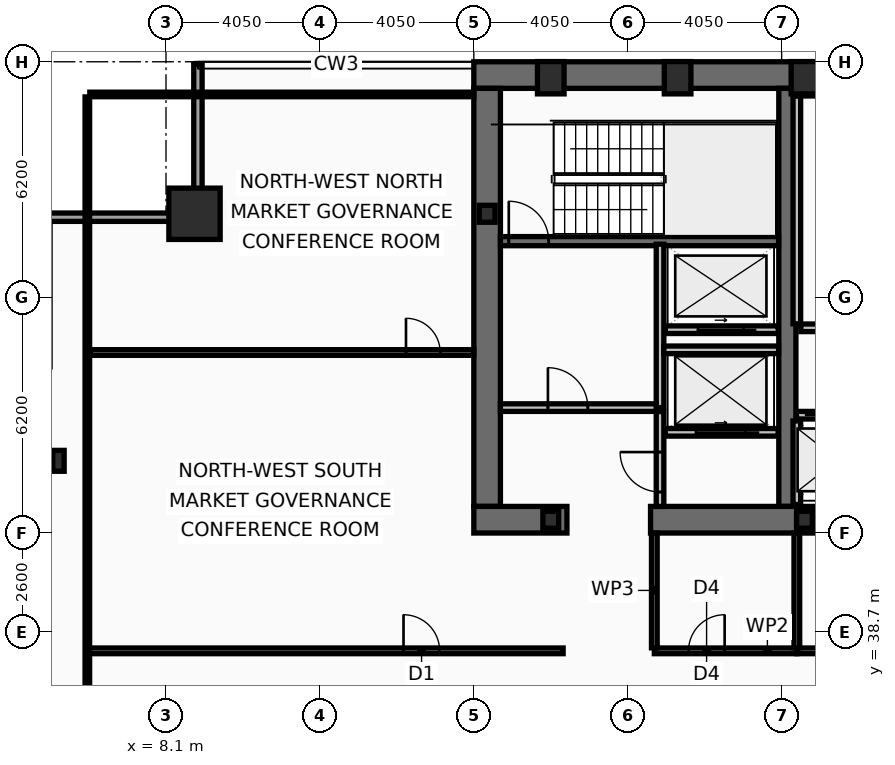
"""IFC4 building model, lengths in metres.
Left out: names, types, materials, properties, quantities, classifications, styles, units other than length and angle.
Written with IfcOpenShell. Run it as: python <this file> out.ifc"""

import sys

from ifc_helpers import new_model, si_unit, direction, frame, frame_2d, origin, origin_2d, place, context, subcontext, project, spatial, rectangle, hollow_rectangle, i_section, extrude, element, fill, save


model = new_model("IFC4")
c1 = context("Model", 3, precision=1e-05, world=origin(), true_north=direction((0.0, 1.0)))
c2 = subcontext(c1, "Body", "Model", "MODEL_VIEW")
j1 = project(units=[si_unit("LENGTHUNIT", "METRE"), si_unit("PLANEANGLEUNIT", "RADIAN")], contexts=[c1])
p1 = place(None, origin())
s1 = spatial("IfcSite", under=j1, at=p1, CompositionType="ELEMENT")
p2 = place(p1, origin())
s2 = spatial("IfcBuilding", under=s1, at=p2, CompositionType="ELEMENT")
p3 = place(p2, frame((0.0, 0.0, 161.4)))
s3 = spatial("IfcBuildingStorey", under=s2, at=p3, CompositionType="ELEMENT", Elevation=161.4)
p4 = place(p3, frame((16.2, 53.35, 0.0), z_axis=(0.0, 0.0, 1.0), x_axis=(1.0, 0.0, 0.0)))
e1 = element("IfcWall", 1, at=p4, inside=s3, PredefinedType="SHEAR", context=c2, shape_type="SweptSolid", body=[
    extrude(rectangle(XDim=40.5, YDim=0.7, at=frame_2d((20.25, 0.0))), origin(), (0.0, 0.0, 1.0), 3.44),
])
p5 = place(p3, frame((16.55, 42.0, 0.0), z_axis=(0.0, 0.0, 1.0), x_axis=(0.0, 1.0, 0.0)))
e2 = element("IfcWall", 2, at=p5, inside=s3, PredefinedType="SHEAR", context=c2, shape_type="SweptSolid", body=[
    extrude(rectangle(XDim=11.0, YDim=0.7, at=frame_2d((5.5, 0.0))), origin(), (0.0, 0.0, 1.0), 3.44),
])
p6 = place(p3, frame((24.45, 42.0, 0.0), z_axis=(0.0, 0.0, 1.0), x_axis=(0.0, 1.0, 0.0)))
e3 = element("IfcWall", 3, at=p6, inside=s3, PredefinedType="SHEAR", context=c2, shape_type="SweptSolid", body=[
    extrude(rectangle(XDim=11.0, YDim=0.45, at=frame_2d((5.5, 0.0))), origin(), (0.0, 0.0, 1.0), 3.44),
])
p7 = place(p3, frame((18.65, 41.65, 0.0), z_axis=(0.0, 0.0, 1.0), x_axis=(-1.0, 0.0, 0.0)))
e4 = element("IfcWall", 4, at=p7, inside=s3, PredefinedType="SHEAR", context=c2, shape_type="SweptSolid", body=[
    extrude(rectangle(XDim=2.45, YDim=0.7, at=frame_2d((1.225, 0.0))), origin(), (0.0, 0.0, 1.0), 3.44),
])
p8 = place(p3, frame((32.3, 41.65, 0.0), z_axis=(0.0, 0.0, 1.0), x_axis=(-1.0, 0.0, 0.0)))
e5 = element("IfcWall", 5, at=p8, inside=s3, PredefinedType="SHEAR", context=c2, shape_type="SweptSolid", body=[
    extrude(rectangle(XDim=11.45, YDim=0.7, at=frame_2d((5.725, 0.0))), origin(), (0.0, 0.0, 1.0), 3.44),
])
p9 = place(p3, frame((16.9, 48.98, 0.0), z_axis=(0.0, 0.0, 1.0), x_axis=(1.0, 0.0, 0.0)))
e6 = element("IfcWall", 6, at=p9, inside=s3, PredefinedType="SHEAR", context=c2, shape_type="SweptSolid", body=[
    extrude(rectangle(XDim=7.32, YDim=0.24, at=frame_2d((3.66, 0.0))), origin(), (0.0, 0.0, 1.0), 3.44),
])
p10 = place(p9, frame((0.22, 0.0, 0.0)))
e7 = element("IfcOpeningElement", 7, at=p10, cuts=e6, PredefinedType="OPENING", context=c2, shape_type="SweptSolid", body=[
    extrude(rectangle(XDim=1.05, YDim=2.15, at=frame_2d((0.525, 1.075))), frame((0.0, 0.13, 0.0), z_axis=(0.0, -1.0, 0.0), x_axis=(1.0, 0.0, 0.0)), (0.0, 0.0, 1.0), 0.26),
])
p11 = place(p3, frame((8.85, 49.7, 0.0), z_axis=(0.0, 0.0, 1.0), x_axis=(1.0, 0.0, 0.0)))
e8 = element("IfcColumn", 8, at=p11, inside=s3, PredefinedType="COLUMN", context=c2, shape_type="SweptSolid", body=[
    extrude(hollow_rectangle(XDim=1.35, YDim=1.35, WallThickness=0.065, at=origin_2d()), origin(), (0.0, 0.0, 1.0), 3.6),
])
for number, where, z_axis, x_axis in (
    (9, (18.225, 53.28, 0.0), (0.0, 0.0, 1.0), (1.0, 0.0, 0.0)),
    (10, (21.562, 53.28, 0.0), (0.0, 0.0, 1.0), (1.0, 0.0, 0.0)),
    (11, (24.9, 53.28, 0.0), (0.0, 0.0, 1.0), (1.0, 0.0, 0.0)),
):
    element("IfcColumn", number, at=place(p3, frame(where, z_axis=z_axis, x_axis=x_axis)), inside=s3, PredefinedType="COLUMN", context=c2, shape_type="SweptSolid", body=[
        extrude(hollow_rectangle(XDim=0.7, YDim=0.85, WallThickness=0.05, at=origin_2d()), origin(), (0.0, 0.0, 1.0), 3.6),
    ])
p12 = place(p3, frame((5.27, 43.2, 0.0), z_axis=(0.0, 0.0, 1.0), x_axis=(1.0, 0.0, 0.0)))
e12 = element("IfcColumn", 12, at=p12, inside=s3, PredefinedType="COLUMN", context=c2, shape_type="SweptSolid", body=[
    extrude(i_section(OverallWidth=0.3, OverallDepth=0.55, WebThickness=0.015, FlangeThickness=0.029, at=origin_2d()), origin(), (0.0, 0.0, 1.0), 3.6),
])
for number, where, z_axis, x_axis in (
    (13, (16.55, 49.7, 0.0), (0.0, 0.0, 1.0), (1.0, 0.0, 0.0)),
    (14, (18.225, 41.65, 0.0), (0.0, 0.0, 1.0), (1.0, 0.0, 0.0)),
    (15, (24.9, 41.65, 0.0), (0.0, 0.0, 1.0), (1.0, 0.0, 0.0)),
):
    element("IfcColumn", number, at=place(p3, frame(where, z_axis=z_axis, x_axis=x_axis)), inside=s3, PredefinedType="COLUMN", context=c2, shape_type="SweptSolid", body=[
        extrude(i_section(OverallWidth=0.416, OverallDepth=0.446, WebThickness=0.039, FlangeThickness=0.063, at=origin_2d()), origin(), (0.0, 0.0, 1.0), 3.6),
    ])
p13 = place(p3, frame((4.83, 49.61, 0.0), z_axis=(0.0, 0.0, 1.0), x_axis=(1.0, 0.0, 0.0)))
e16 = element("IfcWall", 16, at=p13, inside=s3, PredefinedType="SOLIDWALL", context=c2, shape_type="SweptSolid", body=[
    extrude(rectangle(XDim=4.22, YDim=0.22, at=frame_2d((2.11, 0.0))), origin(), (0.0, 0.0, 1.0), 2.83),
])
p14 = place(p3, frame((8.94, 49.72, 0.0), z_axis=(0.0, 0.0, 1.0), x_axis=(0.0, 1.0, 0.0)))
e17 = element("IfcWall", 17, at=p14, inside=s3, PredefinedType="SOLIDWALL", context=c2, shape_type="SweptSolid", body=[
    extrude(rectangle(XDim=3.91, YDim=0.22, at=frame_2d((1.955, 0.0))), origin(), (0.0, 0.0, 1.0), 2.83),
])
p15 = place(p3, frame((24.69, 44.4, 0.0), z_axis=(0.0, 0.0, 1.0), x_axis=(1.0, 0.0, 0.0)))
e18 = element("IfcWall", 18, at=p15, inside=s3, PredefinedType="PARTITIONING", context=c2, shape_type="SweptSolid", body=[
    extrude(rectangle(XDim=6.53, YDim=0.2, at=frame_2d((3.265, 0.0))), origin(), (0.0, 0.0, 1.0), 3.44),
])
p16 = place(p15, frame((0.53, 0.0, 0.0)))
e19 = element("IfcOpeningElement", 19, at=p16, cuts=e18, PredefinedType="OPENING", context=c2, shape_type="SweptSolid", body=[
    extrude(rectangle(XDim=1.1, YDim=2.18, at=frame_2d((0.55, 1.09))), frame((0.0, 0.11, 0.0), z_axis=(0.0, -1.0, 0.0), x_axis=(1.0, 0.0, 0.0)), (0.0, 0.0, 1.0), 0.22),
])
p17 = place(p15, frame((2.69, 0.0, 0.0)))
e20 = element("IfcOpeningElement", 20, at=p17, cuts=e18, PredefinedType="OPENING", context=c2, shape_type="SweptSolid", body=[
    extrude(rectangle(XDim=1.1, YDim=2.18, at=frame_2d((0.55, 1.09))), frame((0.0, 0.11, 0.0), z_axis=(0.0, -1.0, 0.0), x_axis=(1.0, 0.0, 0.0)), (0.0, 0.0, 1.0), 0.22),
])
p18 = place(p15, frame((4.85, 0.0, 0.0)))
e21 = element("IfcOpeningElement", 21, at=p18, cuts=e18, PredefinedType="OPENING", context=c2, shape_type="SweptSolid", body=[
    extrude(rectangle(XDim=1.1, YDim=2.18, at=frame_2d((0.55, 1.09))), frame((0.0, 0.11, 0.0), z_axis=(0.0, -1.0, 0.0), x_axis=(1.0, 0.0, 0.0)), (0.0, 0.0, 1.0), 0.22),
])
p19 = place(p3, frame((24.21, 43.95, 0.0), z_axis=(0.0, 0.0, 1.0), x_axis=(-1.0, 0.0, 0.0)))
e22 = element("IfcWall", 22, at=p19, inside=s3, PredefinedType="PARTITIONING", context=c2, shape_type="SweptSolid", body=[
    extrude(rectangle(XDim=2.97, YDim=0.2, at=frame_2d((1.485, 0.0))), origin(), (0.0, 0.0, 1.0), 3.44),
])
p20 = place(p19, frame((0.86, 0.0, 0.0)))
e23 = element("IfcOpeningElement", 23, at=p20, cuts=e22, PredefinedType="OPENING", context=c2, shape_type="SweptSolid", body=[
    extrude(rectangle(XDim=1.3, YDim=2.18, at=frame_2d((0.65, 1.09))), frame((0.0, 0.11, 0.0), z_axis=(0.0, -1.0, 0.0), x_axis=(1.0, 0.0, 0.0)), (0.0, 0.0, 1.0), 0.22),
])
p21 = place(p3, frame((24.21, 46.65, 0.0), z_axis=(0.0, 0.0, 1.0), x_axis=(-1.0, 0.0, 0.0)))
e24 = element("IfcWall", 24, at=p21, inside=s3, PredefinedType="PARTITIONING", context=c2, shape_type="SweptSolid", body=[
    extrude(rectangle(XDim=2.97, YDim=0.2, at=frame_2d((1.485, 0.0))), origin(), (0.0, 0.0, 1.0), 3.44),
])
p22 = place(p21, frame((0.91, 0.0, 0.0)))
e25 = element("IfcOpeningElement", 25, at=p22, cuts=e24, PredefinedType="OPENING", context=c2, shape_type="SweptSolid", body=[
    extrude(rectangle(XDim=1.2, YDim=2.18, at=frame_2d((0.6, 1.09))), frame((0.0, 0.11, 0.0), z_axis=(0.0, -1.0, 0.0), x_axis=(1.0, 0.0, 0.0)), (0.0, 0.0, 1.0), 0.22),
])
p23 = place(p3, frame((21.1, 44.6, 0.0), z_axis=(0.0, 0.0, 1.0), x_axis=(0.0, 1.0, 0.0)))
e26 = element("IfcWall", 26, at=p23, inside=s3, PredefinedType="PARTITIONING", context=c2, shape_type="SweptSolid", body=[
    extrude(rectangle(XDim=4.3, YDim=0.2, at=frame_2d((2.15, 0.0))), origin(), (0.0, 0.0, 1.0), 3.44),
])
p24 = place(p3, frame((16.9, 44.6, 0.0), z_axis=(0.0, 0.0, 1.0), x_axis=(1.0, 0.0, 0.0)))
e27 = element("IfcWall", 27, at=p24, inside=s3, PredefinedType="PARTITIONING", context=c2, shape_type="SweptSolid", body=[
    extrude(rectangle(XDim=4.1, YDim=0.2, at=frame_2d((2.05, 0.0))), origin(), (0.0, 0.0, 1.0), 3.44),
])
p25 = place(p24, frame((1.25, 0.0, 0.0)))
e28 = element("IfcOpeningElement", 28, at=p25, cuts=e27, PredefinedType="OPENING", context=c2, shape_type="SweptSolid", body=[
    extrude(rectangle(XDim=1.05, YDim=2.15, at=frame_2d((0.525, 1.075))), frame((0.0, 0.11, 0.0), z_axis=(0.0, -1.0, 0.0), x_axis=(1.0, 0.0, 0.0)), (0.0, 0.0, 1.0), 0.22),
])
p26 = place(p3, frame((21.2, 46.12, 0.0), z_axis=(0.0, 0.0, 1.0), x_axis=(1.0, 0.0, 0.0)))
e29 = element("IfcWall", 29, at=p26, inside=s3, PredefinedType="PARTITIONING", context=c2, shape_type="SweptSolid", body=[
    extrude(rectangle(XDim=3.02, YDim=0.2, at=frame_2d((1.51, 0.0))), origin(), (0.0, 0.0, 1.0), 3.44),
])
p27 = place(p3, frame((21.1, 42.0, 0.0), z_axis=(0.0, 0.0, 1.0), x_axis=(0.0, 1.0, 0.0)))
e30 = element("IfcWall", 30, at=p27, inside=s3, PredefinedType="PARTITIONING", context=c2, shape_type="SweptSolid", body=[
    extrude(rectangle(XDim=2.495, YDim=0.2, at=frame_2d((1.248, 0.0))), origin(), (0.0, 0.0, 1.0), 3.44),
])
p28 = place(p27, frame((0.38, 0.0, 0.0)))
e31 = element("IfcOpeningElement", 31, at=p28, cuts=e30, PredefinedType="OPENING", context=c2, shape_type="SweptSolid", body=[
    extrude(rectangle(XDim=1.05, YDim=2.15, at=frame_2d((0.525, 1.075))), frame((0.0, 0.11, 0.0), z_axis=(0.0, -1.0, 0.0), x_axis=(1.0, 0.0, 0.0)), (0.0, 0.0, 1.0), 0.22),
])
p29 = place(p3, frame((24.7, 46.805, 0.0), z_axis=(0.0, 0.0, 1.0), x_axis=(0.0, 1.0, 0.0)))
e32 = element("IfcWall", 32, at=p29, inside=s3, PredefinedType="PARTITIONING", context=c2, shape_type="SweptSolid", body=[
    extrude(rectangle(XDim=5.99, YDim=0.2, at=frame_2d((2.995, 0.0))), origin(), (0.0, 0.0, 1.0), 3.44),
])
p30 = place(p3, frame((24.805, 52.86, 0.0), z_axis=(0.0, 0.0, 1.0), x_axis=(1.0, 0.0, 0.0)))
e33 = element("IfcWall", 33, at=p30, inside=s3, PredefinedType="PARTITIONING", context=c2, shape_type="SweptSolid", body=[
    extrude(rectangle(XDim=7.51, YDim=0.12, at=frame_2d((3.755, 0.0))), origin(), (0.0, 0.0, 1.0), 3.44),
])
p31 = place(p3, frame((24.805, 46.7, 0.0), z_axis=(0.0, 0.0, 1.0), x_axis=(1.0, 0.0, 0.0)))
e34 = element("IfcWall", 34, at=p31, inside=s3, PredefinedType="PARTITIONING", context=c2, shape_type="SweptSolid", body=[
    extrude(rectangle(XDim=7.51, YDim=0.2, at=frame_2d((3.755, 0.0))), origin(), (0.0, 0.0, 1.0), 3.44),
])
p32 = place(p31, frame((0.55, 0.0, 0.0)))
e35 = element("IfcOpeningElement", 35, at=p32, cuts=e34, PredefinedType="OPENING", context=c2, shape_type="SweptSolid", body=[
    extrude(rectangle(XDim=0.95, YDim=2.1, at=frame_2d((0.475, 1.05))), frame((0.0, 0.11, 0.0), z_axis=(0.0, -1.0, 0.0), x_axis=(1.0, 0.0, 0.0)), (0.0, 0.0, 1.0), 0.22),
])
p33 = place(p31, frame((3.784, 0.0, 0.0)))
e36 = element("IfcOpeningElement", 36, at=p33, cuts=e34, PredefinedType="OPENING", context=c2, shape_type="SweptSolid", body=[
    extrude(rectangle(XDim=0.95, YDim=2.1, at=frame_2d((0.475, 1.05))), frame((0.0, 0.11, 0.0), z_axis=(0.0, -1.0, 0.0), x_axis=(1.0, 0.0, 0.0)), (0.0, 0.0, 1.0), 0.22),
])
p34 = place(p3, frame((24.7, 42.05, 0.0), z_axis=(0.0, 0.0, 1.0), x_axis=(0.0, 1.0, 0.0)))
e37 = element("IfcWall", 37, at=p34, inside=s3, PredefinedType="PARTITIONING", context=c2, shape_type="SweptSolid", body=[
    extrude(rectangle(XDim=2.2, YDim=0.2, at=frame_2d((1.1, 0.0))), origin(), (0.0, 0.0, 1.0), 3.44),
])
p35 = place(p3, frame((20.95, 38.2, 0.0), z_axis=(0.0, 0.0, 1.0), x_axis=(1.0, 0.0, 0.0)))
e38 = element("IfcWall", 38, at=p35, inside=s3, PredefinedType="PARTITIONING", context=c2, shape_type="SweptSolid", body=[
    extrude(rectangle(XDim=3.75, YDim=0.15, at=frame_2d((1.875, 0.0))), origin(), (0.0, 0.0, 1.0), 2.73),
])
p36 = place(p35, frame((0.9, 0.0, 0.0)))
e39 = element("IfcOpeningElement", 39, at=p36, cuts=e38, PredefinedType="OPENING", context=c2, shape_type="SweptSolid", body=[
    extrude(rectangle(XDim=0.95, YDim=2.05, at=frame_2d((0.475, 1.025))), frame((0.0, 0.085, 0.0), z_axis=(0.0, -1.0, 0.0), x_axis=(1.0, 0.0, 0.0)), (0.0, 0.0, 1.0), 0.17),
])
p37 = place(p3, frame((24.7, 38.2, 0.0), z_axis=(0.0, 0.0, 1.0), x_axis=(1.0, 0.0, 0.0)))
e40 = element("IfcWall", 40, at=p37, inside=s3, PredefinedType="PARTITIONING", context=c2, shape_type="SweptSolid", body=[
    extrude(rectangle(XDim=4.5, YDim=0.15, at=frame_2d((2.25, 0.0))), origin(), (0.0, 0.0, 1.0), 2.73),
])
p38 = place(p37, frame((0.9, 0.0, 0.0)))
e41 = element("IfcOpeningElement", 41, at=p38, cuts=e40, PredefinedType="OPENING", context=c2, shape_type="SweptSolid", body=[
    extrude(rectangle(XDim=0.95, YDim=2.05, at=frame_2d((0.475, 1.025))), frame((0.0, 0.085, 0.0), z_axis=(0.0, -1.0, 0.0), x_axis=(1.0, 0.0, 0.0)), (0.0, 0.0, 1.0), 0.17),
])
p39 = place(p3, frame((20.95, 38.28, 0.0), z_axis=(0.0, 0.0, 1.0), x_axis=(0.0, 1.0, 0.0)))
e42 = element("IfcWall", 42, at=p39, inside=s3, PredefinedType="PARTITIONING", context=c2, shape_type="SweptSolid", body=[
    extrude(rectangle(XDim=3.02, YDim=0.15, at=frame_2d((1.51, 0.0))), origin(), (0.0, 0.0, 1.0), 3.44),
])
p40 = place(p3, frame((24.7, 38.28, 0.0), z_axis=(0.0, 0.0, 1.0), x_axis=(0.0, 1.0, 0.0)))
e43 = element("IfcWall", 43, at=p40, inside=s3, PredefinedType="PARTITIONING", context=c2, shape_type="SweptSolid", body=[
    extrude(rectangle(XDim=3.02, YDim=0.15, at=frame_2d((1.51, 0.0))), origin(), (0.0, 0.0, 1.0), 2.73),
])
p41 = place(p3, frame((6.03, 38.2, 0.0), z_axis=(0.0, 0.0, 1.0), x_axis=(1.0, 0.0, 0.0)))
e44 = element("IfcWall", 44, at=p41, inside=s3, PredefinedType="PARTITIONING", context=c2, shape_type="SweptSolid", body=[
    extrude(rectangle(XDim=12.52, YDim=0.15, at=frame_2d((6.26, 0.0))), origin(), (0.0, 0.0, 1.0), 2.73),
])
p42 = place(p41, frame((8.32, 0.0, 0.0)))
e45 = element("IfcOpeningElement", 45, at=p42, cuts=e44, PredefinedType="OPENING", context=c2, shape_type="SweptSolid", body=[
    extrude(rectangle(XDim=0.95, YDim=2.05, at=frame_2d((0.475, 1.025))), frame((0.0, 0.085, 0.0), z_axis=(0.0, -1.0, 0.0), x_axis=(1.0, 0.0, 0.0)), (0.0, 0.0, 1.0), 0.17),
])
p43 = place(p3, frame((6.095, 46.05, 0.0), z_axis=(0.0, 0.0, 1.0), x_axis=(1.0, 0.0, 0.0)))
e46 = element("IfcWall", 46, at=p43, inside=s3, PredefinedType="PARTITIONING", context=c2, shape_type="SweptSolid", body=[
    extrude(rectangle(XDim=10.105, YDim=0.15, at=frame_2d((5.052, 0.0))), origin(), (0.0, 0.0, 1.0), 2.83),
])
p44 = place(p43, frame((8.32, 0.0, 0.0)))
e47 = element("IfcOpeningElement", 47, at=p44, cuts=e46, PredefinedType="OPENING", context=c2, shape_type="SweptSolid", body=[
    extrude(rectangle(XDim=0.9, YDim=2.05, at=frame_2d((0.45, 1.025))), frame((0.0, 0.085, 0.0), z_axis=(0.0, -1.0, 0.0), x_axis=(1.0, 0.0, 0.0)), (0.0, 0.0, 1.0), 0.17),
])
p45 = place(p3, frame((6.03, 10.665, 0.0), z_axis=(0.0, 0.0, 1.0), x_axis=(0.0, 1.0, 0.0)))
e48 = element("IfcWall", 48, at=p45, inside=s3, PredefinedType="PARTITIONING", context=c2, shape_type="SweptSolid", body=[
    extrude(rectangle(XDim=42.11, YDim=0.12, at=frame_2d((21.055, 0.0))), origin(), (0.0, 0.0, 1.0), 2.73),
])
p46 = place(p3, frame((6.095, 52.84, 0.0), z_axis=(0.0, 0.0, 1.0), x_axis=(1.0, 0.0, 0.0)))
e49 = element("IfcWall", 49, at=p46, inside=s3, PredefinedType="PARTITIONING", context=c2, shape_type="SweptSolid", body=[
    extrude(rectangle(XDim=10.105, YDim=0.12, at=frame_2d((5.052, 0.0))), origin(), (0.0, 0.0, 1.0), 3.44),
])
p47 = place(p10, origin())
e50 = element("IfcDoor", 50, at=p47, inside=s3, OperationType="SINGLE_SWING_LEFT", PredefinedType="DOOR", context=c2, shape_type="SweptSolid", body=[
    extrude(rectangle(XDim=1.05, YDim=2.15, at=frame_2d((0.525, 1.075))), frame((0.0, 0.025, 0.0), z_axis=(0.0, -1.0, 0.0), x_axis=(1.0, 0.0, 0.0)), (0.0, 0.0, 1.0), 0.05),
])
fill(e7, e50)
p48 = place(p20, origin())
e51 = element("IfcDoor", 51, at=p48, inside=s3, OperationType="SLIDING_TO_LEFT", PredefinedType="DOOR", context=c2, shape_type="SweptSolid", body=[
    extrude(rectangle(XDim=1.3, YDim=2.18, at=frame_2d((0.65, 1.09))), frame((0.0, 0.025, 0.0), z_axis=(0.0, -1.0, 0.0), x_axis=(1.0, 0.0, 0.0)), (0.0, 0.0, 1.0), 0.05),
])
fill(e23, e51)
p49 = place(p22, origin())
e52 = element("IfcDoor", 52, at=p49, inside=s3, OperationType="SLIDING_TO_LEFT", PredefinedType="DOOR", context=c2, shape_type="SweptSolid", body=[
    extrude(rectangle(XDim=1.2, YDim=2.18, at=frame_2d((0.6, 1.09))), frame((0.0, 0.025, 0.0), z_axis=(0.0, -1.0, 0.0), x_axis=(1.0, 0.0, 0.0)), (0.0, 0.0, 1.0), 0.05),
])
fill(e25, e52)
p50 = place(p25, origin())
e53 = element("IfcDoor", 53, at=p50, inside=s3, OperationType="SINGLE_SWING_LEFT", PredefinedType="DOOR", context=c2, shape_type="SweptSolid", body=[
    extrude(rectangle(XDim=1.05, YDim=2.15, at=frame_2d((0.525, 1.075))), frame((0.0, 0.025, 0.0), z_axis=(0.0, -1.0, 0.0), x_axis=(1.0, 0.0, 0.0)), (0.0, 0.0, 1.0), 0.05),
])
fill(e28, e53)
p51 = place(p28, origin())
e54 = element("IfcDoor", 54, at=p51, inside=s3, OperationType="SINGLE_SWING_RIGHT", PredefinedType="DOOR", context=c2, shape_type="SweptSolid", body=[
    extrude(rectangle(XDim=1.05, YDim=2.15, at=frame_2d((0.525, 1.075))), frame((0.0, 0.025, 0.0), z_axis=(0.0, -1.0, 0.0), x_axis=(1.0, 0.0, 0.0)), (0.0, 0.0, 1.0), 0.05),
])
fill(e31, e54)
p52 = place(p36, origin())
e55 = element("IfcDoor", 55, at=p52, inside=s3, OperationType="SINGLE_SWING_RIGHT", PredefinedType="DOOR", context=c2, shape_type="SweptSolid", body=[
    extrude(rectangle(XDim=0.95, YDim=2.05, at=frame_2d((0.475, 1.025))), frame((0.0, 0.025, 0.0), z_axis=(0.0, -1.0, 0.0), x_axis=(1.0, 0.0, 0.0)), (0.0, 0.0, 1.0), 0.05),
])
fill(e39, e55)
p53 = place(p42, origin())
e56 = element("IfcDoor", 56, at=p53, inside=s3, OperationType="SINGLE_SWING_LEFT", PredefinedType="DOOR", context=c2, shape_type="SweptSolid", body=[
    extrude(rectangle(XDim=0.95, YDim=2.05, at=frame_2d((0.475, 1.025))), frame((0.0, 0.025, 0.0), z_axis=(0.0, -1.0, 0.0), x_axis=(1.0, 0.0, 0.0)), (0.0, 0.0, 1.0), 0.05),
])
fill(e45, e56)
p54 = place(p44, origin())
e57 = element("IfcDoor", 57, at=p54, inside=s3, OperationType="SINGLE_SWING_LEFT", PredefinedType="DOOR", context=c2, shape_type="SweptSolid", body=[
    extrude(rectangle(XDim=0.9, YDim=2.05, at=frame_2d((0.45, 1.025))), frame((0.0, 0.025, 0.0), z_axis=(0.0, -1.0, 0.0), x_axis=(1.0, 0.0, 0.0)), (0.0, 0.0, 1.0), 0.05),
])
fill(e47, e57)
save(model, sys.argv[1])
